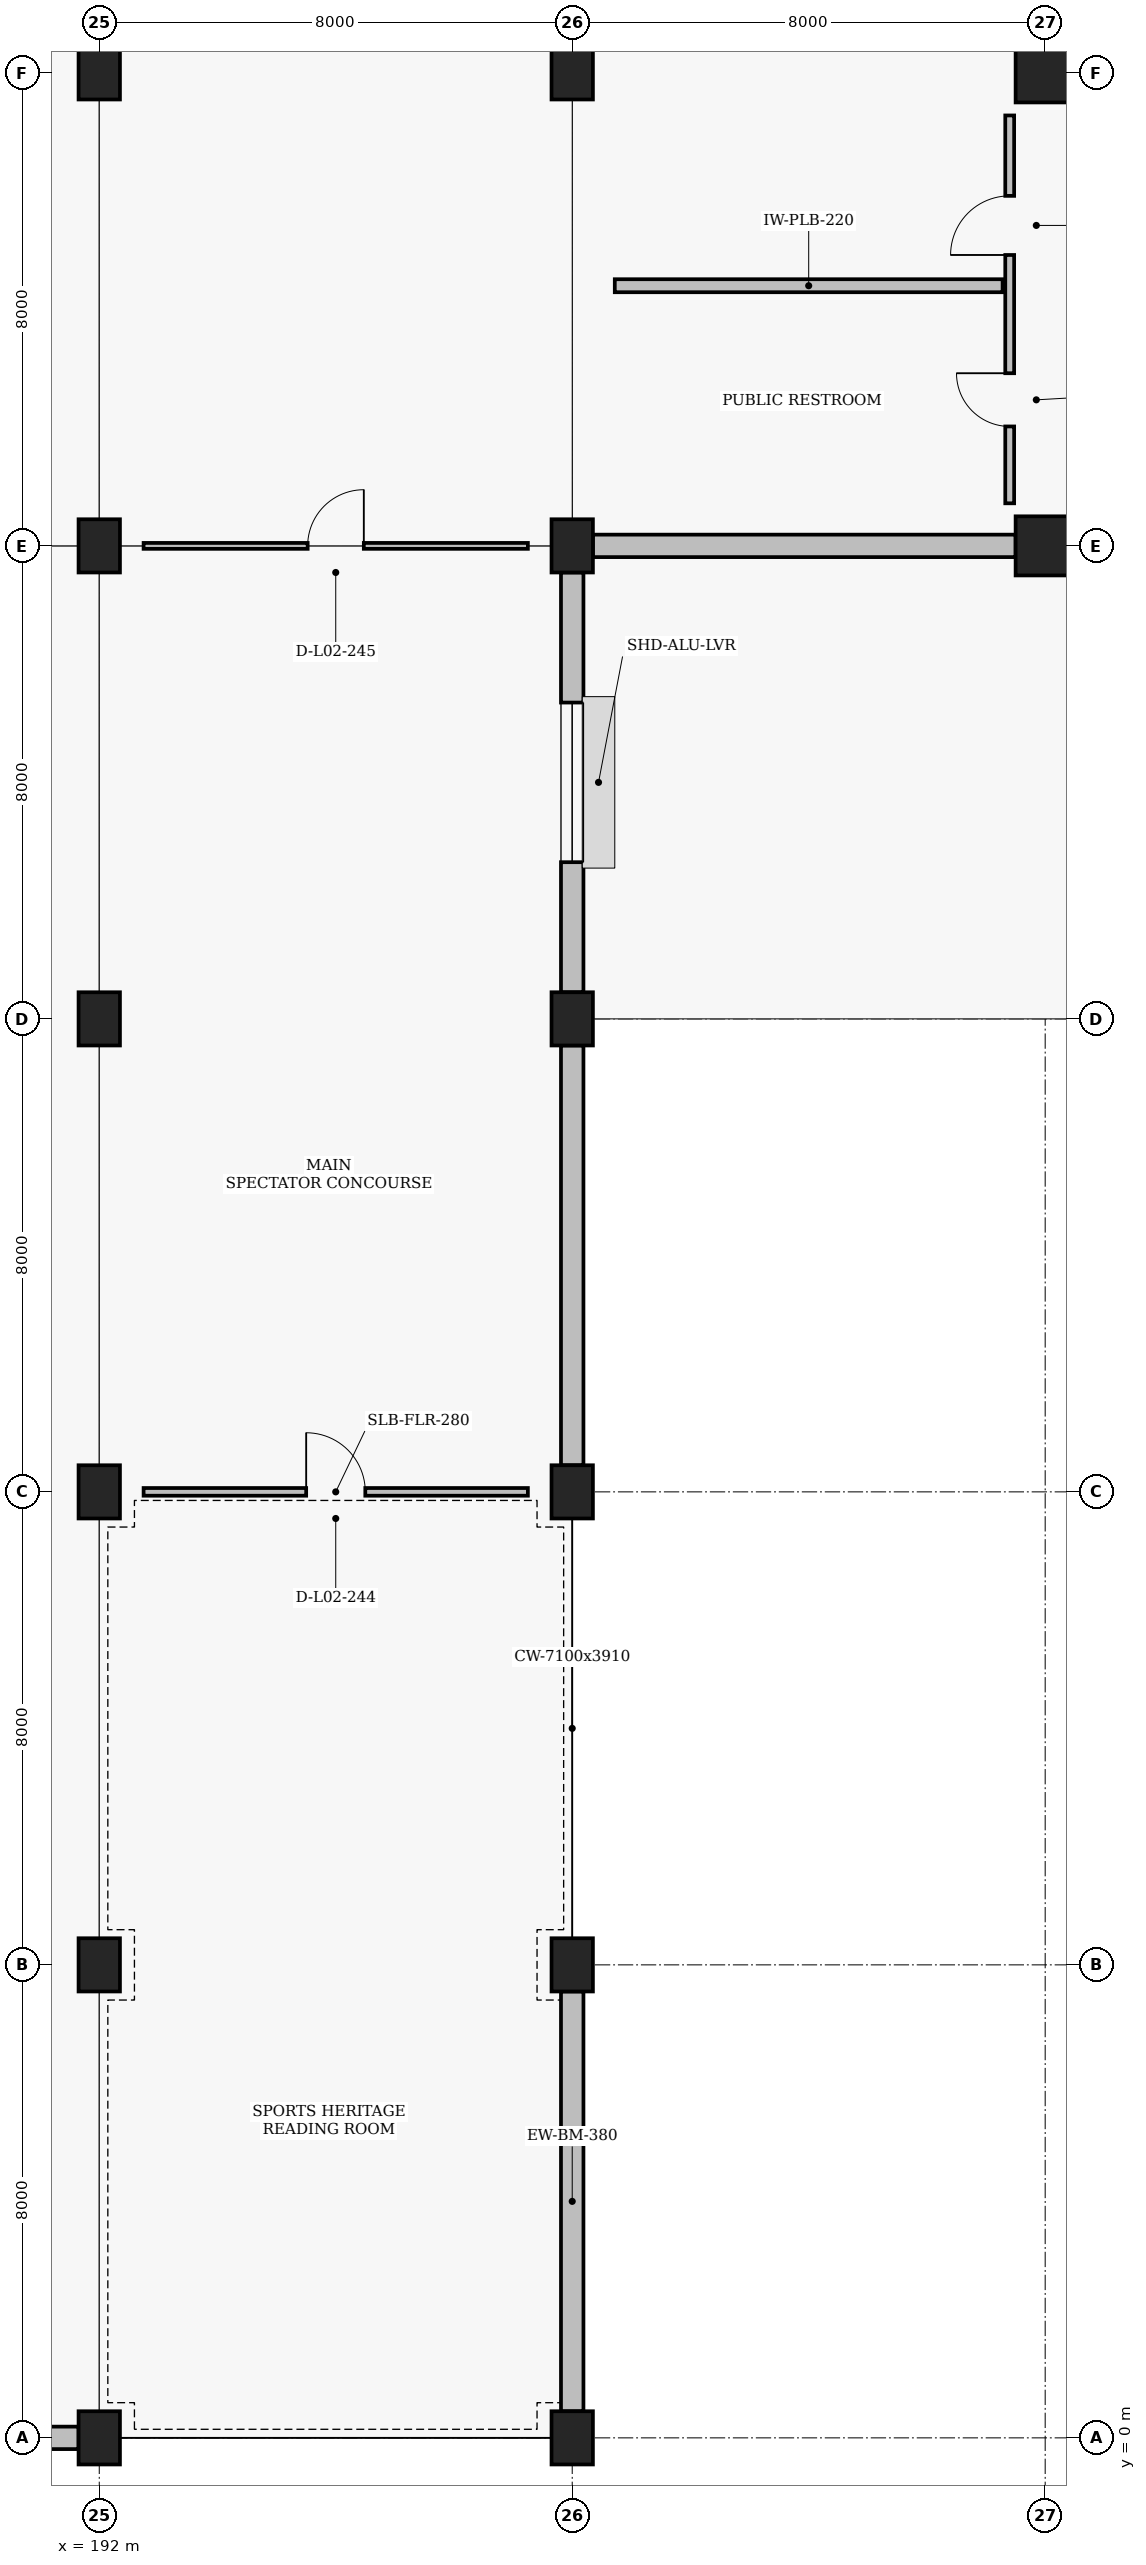
"""IFC4 building model, lengths in metres.
Left out: names, types, materials, properties, quantities, classifications, styles, units other than length and angle.
Written with IfcOpenShell. Run it as: python <this file> out.ifc"""

import sys

from ifc_helpers import new_model, si_unit, direction, frame, frame_2d, origin, origin_2d, place, context, subcontext, project, spatial, rectangle, extrude, element, fill, save


model = new_model("IFC4")
c1 = context("Model", 3, precision=1e-05, world=origin(), true_north=direction((0.0, 1.0)))
c2 = subcontext(c1, "Body", "Model", "MODEL_VIEW")
j1 = project(units=[si_unit("LENGTHUNIT", "METRE"), si_unit("PLANEANGLEUNIT", "RADIAN")], contexts=[c1])
p1 = place(None, origin())
s1 = spatial("IfcSite", under=j1, at=p1, CompositionType="ELEMENT")
p2 = place(p1, origin())
s2 = spatial("IfcBuilding", under=s1, at=p2, CompositionType="ELEMENT")
p3 = place(p2, frame((0.0, 0.0, 4.8)))
s3 = spatial("IfcBuildingStorey", under=s2, at=p3, CompositionType="ELEMENT", Elevation=4.8)
for number, where, z_axis, x_axis in (
    (1, (192.0, 0.0, 0.0), (0.0, 0.0, 1.0), (1.0, 0.0, 0.0)),
    (2, (192.0, 8.0, 0.0), (0.0, 0.0, 1.0), (1.0, 0.0, 0.0)),
    (3, (192.0, 16.0, 0.0), (0.0, 0.0, 1.0), (1.0, 0.0, 0.0)),
    (4, (192.0, 24.0, 0.0), (0.0, 0.0, 1.0), (1.0, 0.0, 0.0)),
    (5, (192.0, 32.0, 0.0), (0.0, 0.0, 1.0), (1.0, 0.0, 0.0)),
    (6, (192.0, 40.0, 0.0), (0.0, 0.0, 1.0), (1.0, 0.0, 0.0)),
    (7, (200.0, 0.0, 0.0), (0.0, 0.0, 1.0), (1.0, 0.0, 0.0)),
    (8, (200.0, 8.0, 0.0), (0.0, 0.0, 1.0), (1.0, 0.0, 0.0)),
    (9, (200.0, 16.0, 0.0), (0.0, 0.0, 1.0), (1.0, 0.0, 0.0)),
    (10, (200.0, 24.0, 0.0), (0.0, 0.0, 1.0), (1.0, 0.0, 0.0)),
    (11, (200.0, 32.0, 0.0), (0.0, 0.0, 1.0), (1.0, 0.0, 0.0)),
    (12, (200.0, 40.0, 0.0), (0.0, 0.0, 1.0), (1.0, 0.0, 0.0)),
):
    element("IfcColumn", number, at=place(p3, frame(where, z_axis=z_axis, x_axis=x_axis)), inside=s3, PredefinedType="COLUMN", context=c2, shape_type="SweptSolid", body=[
        extrude(rectangle(XDim=0.7, YDim=0.9, at=origin_2d()), origin(), (0.0, 0.0, 1.0), 4.8),
    ])
for number, where, z_axis, x_axis in (
    (13, (208.0, 32.0, 0.0), (0.0, 0.0, 1.0), (1.0, 0.0, 0.0)),
    (14, (208.0, 40.0, 0.0), (0.0, 0.0, 1.0), (1.0, 0.0, 0.0)),
):
    element("IfcColumn", number, at=place(p3, frame(where, z_axis=z_axis, x_axis=x_axis)), inside=s3, PredefinedType="COLUMN", context=c2, shape_type="SweptSolid", body=[
        extrude(rectangle(XDim=1.0, YDim=1.0, at=origin_2d()), origin(), (0.0, 0.0, 1.0), 4.8),
    ])
p4 = place(p3, frame((184.35, 0.0, 0.0), z_axis=(0.0, 0.0, 1.0), x_axis=(1.0, 0.0, 0.0)))
e15 = element("IfcWall", 15, at=p4, inside=s3, PredefinedType="SOLIDWALL", context=c2, shape_type="SweptSolid", body=[
    extrude(rectangle(XDim=7.3, YDim=0.38, at=frame_2d((3.65, 0.0))), origin(), (0.0, 0.0, 1.0), 3.91),
])
for number, where, z_axis, x_axis in (
    (16, (200.0, 0.45, 0.0), (0.0, 0.0, 1.0), (0.0, 1.0, 0.0)),
    (17, (200.0, 16.45, 0.0), (0.0, 0.0, 1.0), (0.0, 1.0, 0.0)),
):
    element("IfcWall", number, at=place(p3, frame(where, z_axis=z_axis, x_axis=x_axis)), inside=s3, PredefinedType="SOLIDWALL", context=c2, shape_type="SweptSolid", body=[
        extrude(rectangle(XDim=7.1, YDim=0.38, at=frame_2d((3.55, 0.0))), origin(), (0.0, 0.0, 1.0), 3.91),
    ])
p5 = place(p3, frame((200.0, 24.45, 0.0), z_axis=(0.0, 0.0, 1.0), x_axis=(0.0, 1.0, 0.0)))
e18 = element("IfcWall", 18, at=p5, inside=s3, PredefinedType="SOLIDWALL", context=c2, shape_type="SweptSolid", body=[
    extrude(rectangle(XDim=7.1, YDim=0.38, at=frame_2d((3.55, 0.0))), origin(), (0.0, 0.0, 1.0), 3.91),
])
p6 = place(p5, frame((2.2, 0.0, 0.95)))
e19 = element("IfcOpeningElement", 19, at=p6, cuts=e18, PredefinedType="OPENING", context=c2, shape_type="SweptSolid", body=[
    extrude(rectangle(XDim=2.7, YDim=2.1, at=frame_2d((1.35, 1.05))), frame((0.0, 0.2, 0.0), z_axis=(0.0, -1.0, 0.0), x_axis=(1.0, 0.0, 0.0)), (0.0, 0.0, 1.0), 0.4),
])
p7 = place(p3, frame((200.35, 32.0, 0.0), z_axis=(0.0, 0.0, 1.0), x_axis=(1.0, 0.0, 0.0)))
e20 = element("IfcWall", 20, at=p7, inside=s3, PredefinedType="SOLIDWALL", context=c2, shape_type="SweptSolid", body=[
    extrude(rectangle(XDim=7.15, YDim=0.38, at=frame_2d((3.575, 0.0))), origin(), (0.0, 0.0, 1.0), 3.91),
])
p8 = place(p3, frame((200.72, 36.4, 0.0), z_axis=(0.0, 0.0, 1.0), x_axis=(1.0, 0.0, 0.0)))
e21 = element("IfcWall", 21, at=p8, inside=s3, PredefinedType="PLUMBINGWALL", context=c2, shape_type="SweptSolid", body=[
    extrude(rectangle(XDim=6.56, YDim=0.22, at=frame_2d((3.28, 0.0))), origin(), (0.0, 0.0, 1.0), 4.17),
])
p9 = place(p3, frame((207.4, 32.72, 0.0), z_axis=(0.0, 0.0, 1.0), x_axis=(0.0, 1.0, 0.0)))
e22 = element("IfcWall", 22, at=p9, inside=s3, PredefinedType="PARTITIONING", context=c2, shape_type="SweptSolid", body=[
    extrude(rectangle(XDim=6.56, YDim=0.15, at=frame_2d((3.28, 0.0))), origin(), (0.0, 0.0, 1.0), 3.61),
])
p10 = place(p9, frame((1.3, 0.0, 0.0)))
e23 = element("IfcOpeningElement", 23, at=p10, cuts=e22, PredefinedType="OPENING", context=c2, shape_type="SweptSolid", body=[
    extrude(rectangle(XDim=0.9, YDim=2.1, at=frame_2d((0.45, 1.05))), frame((0.0, 0.085, 0.0), z_axis=(0.0, -1.0, 0.0), x_axis=(1.0, 0.0, 0.0)), (0.0, 0.0, 1.0), 0.17),
])
p11 = place(p9, frame((4.2, 0.0, 0.0)))
e24 = element("IfcOpeningElement", 24, at=p11, cuts=e22, PredefinedType="OPENING", context=c2, shape_type="SweptSolid", body=[
    extrude(rectangle(XDim=1.0, YDim=2.15, at=frame_2d((0.5, 1.075))), frame((0.0, 0.085, 0.0), z_axis=(0.0, -1.0, 0.0), x_axis=(1.0, 0.0, 0.0)), (0.0, 0.0, 1.0), 0.17),
])
p12 = place(p3, frame((192.75, 16.0, 0.0), z_axis=(0.0, 0.0, 1.0), x_axis=(1.0, 0.0, 0.0)))
e25 = element("IfcWall", 25, at=p12, inside=s3, PredefinedType="PARTITIONING", context=c2, shape_type="SweptSolid", body=[
    extrude(rectangle(XDim=6.5, YDim=0.13, at=frame_2d((3.25, 0.0))), origin(), (0.0, 0.0, 1.0), 3.91),
])
p13 = place(p12, frame((2.75, 0.0, 0.0)))
e26 = element("IfcOpeningElement", 26, at=p13, cuts=e25, PredefinedType="OPENING", context=c2, shape_type="SweptSolid", body=[
    extrude(rectangle(XDim=1.0, YDim=2.1, at=frame_2d((0.5, 1.05))), frame((0.0, 0.075, 0.0), z_axis=(0.0, -1.0, 0.0), x_axis=(1.0, 0.0, 0.0)), (0.0, 0.0, 1.0), 0.15),
])
p14 = place(p3, frame((192.75, 32.0, 0.0), z_axis=(0.0, 0.0, 1.0), x_axis=(1.0, 0.0, 0.0)))
e27 = element("IfcWall", 27, at=p14, inside=s3, PredefinedType="PARTITIONING", context=c2, shape_type="SweptSolid", body=[
    extrude(rectangle(XDim=6.5, YDim=0.1, at=frame_2d((3.25, 0.0))), origin(), (0.0, 0.0, 1.0), 3.91),
])
p15 = place(p14, frame((2.775, 0.0, 0.0)))
e28 = element("IfcOpeningElement", 28, at=p15, cuts=e27, PredefinedType="OPENING", context=c2, shape_type="SweptSolid", body=[
    extrude(rectangle(XDim=0.95, YDim=2.1, at=frame_2d((0.475, 1.05))), frame((0.0, 0.06, 0.0), z_axis=(0.0, -1.0, 0.0), x_axis=(1.0, 0.0, 0.0)), (0.0, 0.0, 1.0), 0.12),
])
p16 = place(p6, origin())
e29 = element("IfcWindow", 29, at=p16, inside=s3, PartitioningType="SINGLE_PANEL", PredefinedType="WINDOW", context=c2, shape_type="SweptSolid", body=[
    extrude(rectangle(XDim=2.7, YDim=2.1, at=frame_2d((1.35, 1.05))), frame((0.0, 0.03, 0.0), z_axis=(0.0, -1.0, 0.0), x_axis=(1.0, 0.0, 0.0)), (0.0, 0.0, 1.0), 0.06),
])
fill(e19, e29)
p17 = place(p10, origin())
e30 = element("IfcDoor", 30, at=p17, inside=s3, OperationType="SINGLE_SWING_RIGHT", PredefinedType="DOOR", context=c2, shape_type="SweptSolid", body=[
    extrude(rectangle(XDim=0.9, YDim=2.1, at=frame_2d((0.45, 1.05))), frame((0.0, 0.025, 0.0), z_axis=(0.0, -1.0, 0.0), x_axis=(1.0, 0.0, 0.0)), (0.0, 0.0, 1.0), 0.05),
])
fill(e23, e30)
p18 = place(p11, origin())
e31 = element("IfcDoor", 31, at=p18, inside=s3, OperationType="SINGLE_SWING_LEFT", PredefinedType="DOOR", context=c2, shape_type="SweptSolid", body=[
    extrude(rectangle(XDim=1.0, YDim=2.15, at=frame_2d((0.5, 1.075))), frame((0.0, 0.025, 0.0), z_axis=(0.0, -1.0, 0.0), x_axis=(1.0, 0.0, 0.0)), (0.0, 0.0, 1.0), 0.05),
])
fill(e24, e31)
p19 = place(p13, origin())
e32 = element("IfcDoor", 32, at=p19, inside=s3, OperationType="SINGLE_SWING_LEFT", PredefinedType="DOOR", context=c2, shape_type="SweptSolid", body=[
    extrude(rectangle(XDim=1.0, YDim=2.1, at=frame_2d((0.5, 1.05))), frame((0.0, 0.025, 0.0), z_axis=(0.0, -1.0, 0.0), x_axis=(1.0, 0.0, 0.0)), (0.0, 0.0, 1.0), 0.05),
])
fill(e26, e32)
p20 = place(p15, origin())
e33 = element("IfcDoor", 33, at=p20, inside=s3, OperationType="SINGLE_SWING_RIGHT", PredefinedType="DOOR", context=c2, shape_type="SweptSolid", body=[
    extrude(rectangle(XDim=0.95, YDim=2.1, at=frame_2d((0.475, 1.05))), frame((0.0, 0.025, 0.0), z_axis=(0.0, -1.0, 0.0), x_axis=(1.0, 0.0, 0.0)), (0.0, 0.0, 1.0), 0.05),
])
fill(e28, e33)
save(model, sys.argv[1])
